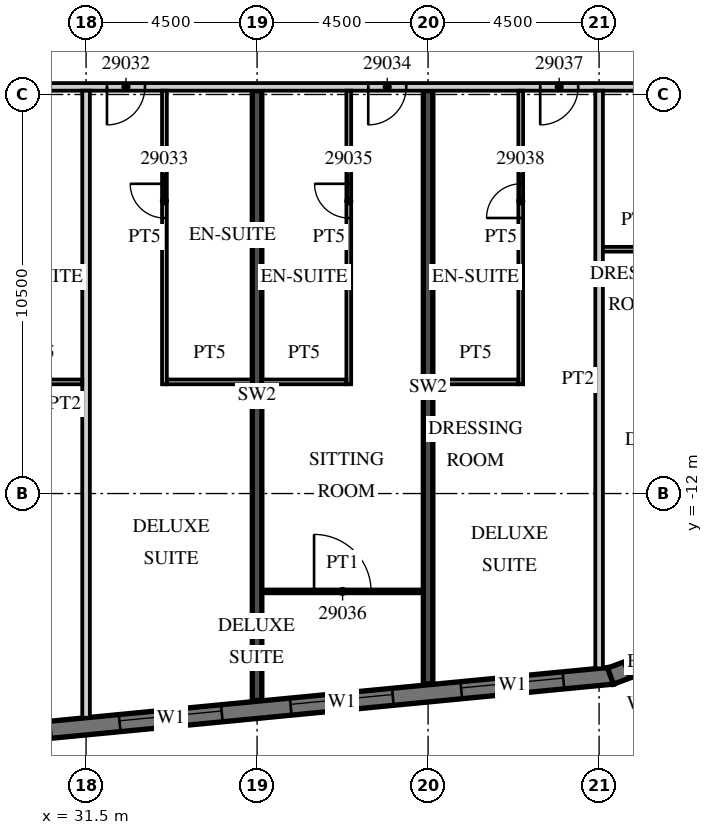
"""IFC4 building model, lengths in metres.
Left out: names, types, materials, properties, quantities, classifications, styles, units other than length and angle.
Written with IfcOpenShell. Run it as: python <this file> out.ifc"""

import sys

from ifc_helpers import new_model, si_unit, direction, frame, frame_2d, origin, place, context, subcontext, project, spatial, polyline, rectangle, outline, extrude, element, fill, save


model = new_model("IFC4")
c1 = context("Model", 3, precision=1e-05, world=origin(), true_north=direction((0.0, 1.0)))
c2 = subcontext(c1, "Body", "Model", "MODEL_VIEW")
j1 = project(units=[si_unit("LENGTHUNIT", "METRE"), si_unit("PLANEANGLEUNIT", "RADIAN")], contexts=[c1])
p1 = place(None, origin())
s1 = spatial("IfcSite", under=j1, at=p1, CompositionType="ELEMENT")
p2 = place(p1, origin())
s2 = spatial("IfcBuilding", under=s1, at=p2, CompositionType="ELEMENT")
p3 = place(p2, frame((0.0, 0.0, 130.6)))
s3 = spatial("IfcBuildingStorey", under=s2, at=p3, CompositionType="ELEMENT", Elevation=130.6)
p4 = place(p3, frame((36.0, -17.444, 0.0), z_axis=(0.0, 0.0, 1.0), x_axis=(0.0, 1.0, 0.0)))
e1 = element("IfcWall", 1, at=p4, inside=s3, PredefinedType="SHEAR", context=c2, shape_type="SweptSolid", body=[
    extrude(rectangle(XDim=16.044, YDim=0.25, at=frame_2d((8.022, 0.0))), origin(), (0.0, 0.0, 1.0), 3.3),
])
p5 = place(p3, frame((40.5, -17.011, 0.0), z_axis=(0.0, 0.0, 1.0), x_axis=(0.0, 1.0, 0.0)))
e2 = element("IfcWall", 2, at=p5, inside=s3, PredefinedType="SHEAR", context=c2, shape_type="SweptSolid", body=[
    extrude(rectangle(XDim=15.611, YDim=0.25, at=frame_2d((7.805, 0.0))), origin(), (0.0, 0.0, 1.0), 3.3),
])
p6 = place(p3, frame((-13.521, -22.46, 0.0), z_axis=(0.0, 0.0, 1.0), x_axis=(0.995396096335, 0.095846812164, 0.0)))
e3 = element("IfcWall", 3, at=p6, inside=s3, PredefinedType="SOLIDWALL", context=c2, shape_type="SweptSolid", body=[
    extrude(rectangle(XDim=59.151, YDim=0.45, at=frame_2d((29.575, 0.0))), origin(), (0.0, 0.0, 1.0), 3.02),
])
p7 = place(p6, frame((0.91, 0.0, 0.45)))
e4 = element("IfcOpeningElement", 4, at=p7, cuts=e3, PredefinedType="OPENING", context=c2, shape_type="SweptSolid", body=[
    extrude(rectangle(XDim=2.7, YDim=2.25, at=frame_2d((1.35, 1.125))), frame((0.0, 0.235, 0.0), z_axis=(0.0, -1.0, 0.0), x_axis=(1.0, 0.0, 0.0)), (0.0, 0.0, 1.0), 0.47),
])
p8 = place(p6, frame((5.431, 0.0, 0.45)))
e5 = element("IfcOpeningElement", 5, at=p8, cuts=e3, PredefinedType="OPENING", context=c2, shape_type="SweptSolid", body=[
    extrude(rectangle(XDim=2.7, YDim=2.25, at=frame_2d((1.35, 1.125))), frame((0.0, 0.235, 0.0), z_axis=(0.0, -1.0, 0.0), x_axis=(1.0, 0.0, 0.0)), (0.0, 0.0, 1.0), 0.47),
])
p9 = place(p6, frame((9.952, 0.0, 0.45)))
e6 = element("IfcOpeningElement", 6, at=p9, cuts=e3, PredefinedType="OPENING", context=c2, shape_type="SweptSolid", body=[
    extrude(rectangle(XDim=2.7, YDim=2.25, at=frame_2d((1.35, 1.125))), frame((0.0, 0.235, 0.0), z_axis=(0.0, -1.0, 0.0), x_axis=(1.0, 0.0, 0.0)), (0.0, 0.0, 1.0), 0.47),
])
p10 = place(p6, frame((14.473, 0.0, 0.45)))
e7 = element("IfcOpeningElement", 7, at=p10, cuts=e3, PredefinedType="OPENING", context=c2, shape_type="SweptSolid", body=[
    extrude(rectangle(XDim=2.7, YDim=2.25, at=frame_2d((1.35, 1.125))), frame((0.0, 0.235, 0.0), z_axis=(0.0, -1.0, 0.0), x_axis=(1.0, 0.0, 0.0)), (0.0, 0.0, 1.0), 0.47),
])
p11 = place(p6, frame((18.994, 0.0, 0.45)))
e8 = element("IfcOpeningElement", 8, at=p11, cuts=e3, PredefinedType="OPENING", context=c2, shape_type="SweptSolid", body=[
    extrude(rectangle(XDim=2.7, YDim=2.25, at=frame_2d((1.35, 1.125))), frame((0.0, 0.235, 0.0), z_axis=(0.0, -1.0, 0.0), x_axis=(1.0, 0.0, 0.0)), (0.0, 0.0, 1.0), 0.47),
])
p12 = place(p6, frame((23.514, 0.0, 0.45)))
e9 = element("IfcOpeningElement", 9, at=p12, cuts=e3, PredefinedType="OPENING", context=c2, shape_type="SweptSolid", body=[
    extrude(rectangle(XDim=2.7, YDim=2.25, at=frame_2d((1.35, 1.125))), frame((0.0, 0.235, 0.0), z_axis=(0.0, -1.0, 0.0), x_axis=(1.0, 0.0, 0.0)), (0.0, 0.0, 1.0), 0.47),
])
p13 = place(p6, frame((28.035, 0.0, 0.45)))
e10 = element("IfcOpeningElement", 10, at=p13, cuts=e3, PredefinedType="OPENING", context=c2, shape_type="SweptSolid", body=[
    extrude(rectangle(XDim=2.7, YDim=2.25, at=frame_2d((1.35, 1.125))), frame((0.0, 0.235, 0.0), z_axis=(0.0, -1.0, 0.0), x_axis=(1.0, 0.0, 0.0)), (0.0, 0.0, 1.0), 0.47),
])
p14 = place(p6, frame((32.556, 0.0, 0.45)))
e11 = element("IfcOpeningElement", 11, at=p14, cuts=e3, PredefinedType="OPENING", context=c2, shape_type="SweptSolid", body=[
    extrude(rectangle(XDim=2.7, YDim=2.25, at=frame_2d((1.35, 1.125))), frame((0.0, 0.235, 0.0), z_axis=(0.0, -1.0, 0.0), x_axis=(1.0, 0.0, 0.0)), (0.0, 0.0, 1.0), 0.47),
])
p15 = place(p6, frame((37.077, 0.0, 0.45)))
e12 = element("IfcOpeningElement", 12, at=p15, cuts=e3, PredefinedType="OPENING", context=c2, shape_type="SweptSolid", body=[
    extrude(rectangle(XDim=2.7, YDim=2.25, at=frame_2d((1.35, 1.125))), frame((0.0, 0.235, 0.0), z_axis=(0.0, -1.0, 0.0), x_axis=(1.0, 0.0, 0.0)), (0.0, 0.0, 1.0), 0.47),
])
p16 = place(p6, frame((41.598, 0.0, 0.45)))
e13 = element("IfcOpeningElement", 13, at=p16, cuts=e3, PredefinedType="OPENING", context=c2, shape_type="SweptSolid", body=[
    extrude(rectangle(XDim=2.7, YDim=2.25, at=frame_2d((1.35, 1.125))), frame((0.0, 0.235, 0.0), z_axis=(0.0, -1.0, 0.0), x_axis=(1.0, 0.0, 0.0)), (0.0, 0.0, 1.0), 0.47),
])
p17 = place(p6, frame((46.118, 0.0, 0.45)))
e14 = element("IfcOpeningElement", 14, at=p17, cuts=e3, PredefinedType="OPENING", context=c2, shape_type="SweptSolid", body=[
    extrude(rectangle(XDim=2.7, YDim=2.25, at=frame_2d((1.35, 1.125))), frame((0.0, 0.235, 0.0), z_axis=(0.0, -1.0, 0.0), x_axis=(1.0, 0.0, 0.0)), (0.0, 0.0, 1.0), 0.47),
])
p18 = place(p6, frame((50.639, 0.0, 0.45)))
e15 = element("IfcOpeningElement", 15, at=p18, cuts=e3, PredefinedType="OPENING", context=c2, shape_type="SweptSolid", body=[
    extrude(rectangle(XDim=2.7, YDim=2.25, at=frame_2d((1.35, 1.125))), frame((0.0, 0.235, 0.0), z_axis=(0.0, -1.0, 0.0), x_axis=(1.0, 0.0, 0.0)), (0.0, 0.0, 1.0), 0.47),
])
p19 = place(p6, frame((55.15, 0.0, 0.45)))
e16 = element("IfcOpeningElement", 16, at=p19, cuts=e3, PredefinedType="OPENING", context=c2, shape_type="SweptSolid", body=[
    extrude(rectangle(XDim=2.7, YDim=2.25, at=frame_2d((1.35, 1.125))), frame((0.0, 0.235, 0.0), z_axis=(0.0, -1.0, 0.0), x_axis=(1.0, 0.0, 0.0)), (0.0, 0.0, 1.0), 0.47),
])
p20 = place(p3, frame((45.3, -16.804, 0.0), z_axis=(0.0, 0.0, 1.0), x_axis=(0.936677599948, 0.350192909346, 0.0)))
e17 = element("IfcWall", 17, at=p20, inside=s3, PredefinedType="SOLIDWALL", context=c2, shape_type="SweptSolid", body=[
    extrude(outline(polyline([(0.0, -0.225), (2.071, -0.225), (1.95, 0.225), (0.121, 0.225), (0.0, -0.225)])), origin(), (0.0, 0.0, 1.0), 3.02),
])
p21 = place(p20, frame((0.435, 0.0, 0.45)))
e18 = element("IfcOpeningElement", 18, at=p21, cuts=e17, PredefinedType="OPENING", context=c2, shape_type="SweptSolid", body=[
    extrude(rectangle(XDim=1.2, YDim=2.25, at=frame_2d((0.6, 1.125))), frame((0.0, 0.235, 0.0), z_axis=(0.0, -1.0, 0.0), x_axis=(1.0, 0.0, 0.0)), (0.0, 0.0, 1.0), 0.47),
])
p22 = place(p3, frame((48.753, -12.672, 0.0), z_axis=(0.0, 0.0, 1.0), x_axis=(-0.095842661909, 0.995396495954, 0.0)))
e19 = element("IfcWall", 19, at=p22, inside=s3, PredefinedType="SOLIDWALL", context=c2, shape_type="SweptSolid", body=[
    extrude(rectangle(XDim=35.0, YDim=0.45, at=frame_2d((17.5, 0.0))), origin(), (0.0, 0.0, 1.0), 3.02),
])
p23 = place(p22, frame((3.072, 0.0, 0.45)))
e20 = element("IfcOpeningElement", 20, at=p23, cuts=e19, PredefinedType="OPENING", context=c2, shape_type="SweptSolid", body=[
    extrude(rectangle(XDim=3.3, YDim=2.25, at=frame_2d((1.65, 1.125))), frame((0.0, 0.235, 0.0), z_axis=(0.0, -1.0, 0.0), x_axis=(1.0, 0.0, 0.0)), (0.0, 0.0, 1.0), 0.47),
])
p24 = place(p22, frame((7.593, 0.0, 0.45)))
e21 = element("IfcOpeningElement", 21, at=p24, cuts=e19, PredefinedType="OPENING", context=c2, shape_type="SweptSolid", body=[
    extrude(rectangle(XDim=3.3, YDim=2.25, at=frame_2d((1.65, 1.125))), frame((0.0, 0.235, 0.0), z_axis=(0.0, -1.0, 0.0), x_axis=(1.0, 0.0, 0.0)), (0.0, 0.0, 1.0), 0.47),
])
p25 = place(p3, frame((-13.5, -1.3, 0.0), z_axis=(0.0, 0.0, 1.0), x_axis=(1.0, 0.0, 0.0)))
e22 = element("IfcWall", 22, at=p25, inside=s3, PredefinedType="PARTITIONING", context=c2, shape_type="SweptSolid", body=[
    extrude(rectangle(XDim=60.932, YDim=0.2, at=frame_2d((30.466, 0.0))), origin(), (0.0, 0.0, 1.0), 3.02),
])
p26 = place(p25, frame((2.925, 0.0, 0.0)))
e23 = element("IfcOpeningElement", 23, at=p26, cuts=e22, PredefinedType="OPENING", context=c2, shape_type="SweptSolid", body=[
    extrude(rectangle(XDim=1.0, YDim=2.1, at=frame_2d((0.5, 1.05))), frame((0.0, 0.11, 0.0), z_axis=(0.0, -1.0, 0.0), x_axis=(1.0, 0.0, 0.0)), (0.0, 0.0, 1.0), 0.22),
])
p27 = place(p25, frame((9.863, 0.0, 0.0)))
e24 = element("IfcOpeningElement", 24, at=p27, cuts=e22, PredefinedType="OPENING", context=c2, shape_type="SweptSolid", body=[
    extrude(rectangle(XDim=1.2, YDim=2.1, at=frame_2d((0.6, 1.05))), frame((0.0, 0.11, 0.0), z_axis=(0.0, -1.0, 0.0), x_axis=(1.0, 0.0, 0.0)), (0.0, 0.0, 1.0), 0.22),
])
p28 = place(p25, frame((14.075, 0.0, 0.0)))
e25 = element("IfcOpeningElement", 25, at=p28, cuts=e22, PredefinedType="OPENING", context=c2, shape_type="SweptSolid", body=[
    extrude(rectangle(XDim=1.0, YDim=2.1, at=frame_2d((0.5, 1.05))), frame((0.0, 0.11, 0.0), z_axis=(0.0, -1.0, 0.0), x_axis=(1.0, 0.0, 0.0)), (0.0, 0.0, 1.0), 0.22),
])
p29 = place(p25, frame((18.55, 0.0, 0.0)))
e26 = element("IfcOpeningElement", 26, at=p29, cuts=e22, PredefinedType="OPENING", context=c2, shape_type="SweptSolid", body=[
    extrude(rectangle(XDim=1.0, YDim=2.1, at=frame_2d((0.5, 1.05))), frame((0.0, 0.11, 0.0), z_axis=(0.0, -1.0, 0.0), x_axis=(1.0, 0.0, 0.0)), (0.0, 0.0, 1.0), 0.22),
])
p30 = place(p25, frame((24.938, 0.0, 0.0)))
e27 = element("IfcOpeningElement", 27, at=p30, cuts=e22, PredefinedType="OPENING", context=c2, shape_type="SweptSolid", body=[
    extrude(rectangle(XDim=1.2, YDim=2.1, at=frame_2d((0.6, 1.05))), frame((0.0, 0.11, 0.0), z_axis=(0.0, -1.0, 0.0), x_axis=(1.0, 0.0, 0.0)), (0.0, 0.0, 1.0), 0.22),
])
p31 = place(p25, frame((36.862, 0.0, 0.0)))
e28 = element("IfcOpeningElement", 28, at=p31, cuts=e22, PredefinedType="OPENING", context=c2, shape_type="SweptSolid", body=[
    extrude(rectangle(XDim=1.2, YDim=2.1, at=frame_2d((0.6, 1.05))), frame((0.0, 0.11, 0.0), z_axis=(0.0, -1.0, 0.0), x_axis=(1.0, 0.0, 0.0)), (0.0, 0.0, 1.0), 0.22),
])
p32 = place(p25, frame((41.075, 0.0, 0.0)))
e29 = element("IfcOpeningElement", 29, at=p32, cuts=e22, PredefinedType="OPENING", context=c2, shape_type="SweptSolid", body=[
    extrude(rectangle(XDim=1.0, YDim=2.1, at=frame_2d((0.5, 1.05))), frame((0.0, 0.11, 0.0), z_axis=(0.0, -1.0, 0.0), x_axis=(1.0, 0.0, 0.0)), (0.0, 0.0, 1.0), 0.22),
])
p33 = place(p25, frame((45.55, 0.0, 0.0)))
e30 = element("IfcOpeningElement", 30, at=p33, cuts=e22, PredefinedType="OPENING", context=c2, shape_type="SweptSolid", body=[
    extrude(rectangle(XDim=1.0, YDim=2.1, at=frame_2d((0.5, 1.05))), frame((0.0, 0.11, 0.0), z_axis=(0.0, -1.0, 0.0), x_axis=(1.0, 0.0, 0.0)), (0.0, 0.0, 1.0), 0.22),
])
p34 = place(p25, frame((52.425, 0.0, 0.0)))
e31 = element("IfcOpeningElement", 31, at=p34, cuts=e22, PredefinedType="OPENING", context=c2, shape_type="SweptSolid", body=[
    extrude(rectangle(XDim=1.0, YDim=2.1, at=frame_2d((0.5, 1.05))), frame((0.0, 0.11, 0.0), z_axis=(0.0, -1.0, 0.0), x_axis=(1.0, 0.0, 0.0)), (0.0, 0.0, 1.0), 0.22),
])
p35 = place(p25, frame((56.95, 0.0, 0.0)))
e32 = element("IfcOpeningElement", 32, at=p35, cuts=e22, PredefinedType="OPENING", context=c2, shape_type="SweptSolid", body=[
    extrude(rectangle(XDim=1.0, YDim=2.1, at=frame_2d((0.5, 1.05))), frame((0.0, 0.11, 0.0), z_axis=(0.0, -1.0, 0.0), x_axis=(1.0, 0.0, 0.0)), (0.0, 0.0, 1.0), 0.22),
])
p36 = place(p25, frame((59.882, 0.0, 0.0)))
e33 = element("IfcOpeningElement", 33, at=p36, cuts=e22, PredefinedType="OPENING", context=c2, shape_type="SweptSolid", body=[
    extrude(rectangle(XDim=0.9, YDim=2.1, at=frame_2d((0.45, 1.05))), frame((0.0, 0.11, 0.0), z_axis=(0.0, -1.0, 0.0), x_axis=(1.0, 0.0, 0.0)), (0.0, 0.0, 1.0), 0.22),
])
p37 = place(p3, frame((31.5, -17.899, 0.0), z_axis=(0.0, 0.0, 1.0), x_axis=(0.0, 1.0, 0.0)))
e34 = element("IfcWall", 34, at=p37, inside=s3, PredefinedType="PARTITIONING", context=c2, shape_type="SweptSolid", body=[
    extrude(rectangle(XDim=16.499, YDim=0.2, at=frame_2d((8.25, 0.0))), origin(), (0.0, 0.0, 1.0), 3.02),
])
p38 = place(p3, frame((29.15, -9.062, 0.0), z_axis=(0.0, 0.0, 1.0), x_axis=(1.0, 0.0, 0.0)))
e35 = element("IfcWall", 35, at=p38, inside=s3, PredefinedType="PARTITIONING", context=c2, shape_type="SweptSolid", body=[
    extrude(rectangle(XDim=2.25, YDim=0.125, at=frame_2d((1.125, 0.0))), origin(), (0.0, 0.0, 1.0), 3.02),
])
p39 = place(p3, frame((33.562, -9.125, 0.0), z_axis=(0.0, 0.0, 1.0), x_axis=(0.0, 1.0, 0.0)))
e36 = element("IfcWall", 36, at=p39, inside=s3, PredefinedType="PARTITIONING", context=c2, shape_type="SweptSolid", body=[
    extrude(rectangle(XDim=7.725, YDim=0.125, at=frame_2d((3.863, 0.0))), origin(), (0.0, 0.0, 1.0), 3.02),
])
p40 = place(p39, frame((4.375, 0.0, 0.0)))
e37 = element("IfcOpeningElement", 37, at=p40, cuts=e36, PredefinedType="OPENING", context=c2, shape_type="SweptSolid", body=[
    extrude(rectangle(XDim=0.9, YDim=2.1, at=frame_2d((0.45, 1.05))), frame((0.0, 0.073, 0.0), z_axis=(0.0, -1.0, 0.0), x_axis=(1.0, 0.0, 0.0)), (0.0, 0.0, 1.0), 0.145),
])
p41 = place(p3, frame((33.625, -9.062, 0.0), z_axis=(0.0, 0.0, 1.0), x_axis=(1.0, 0.0, 0.0)))
e38 = element("IfcWall", 38, at=p41, inside=s3, PredefinedType="PARTITIONING", context=c2, shape_type="SweptSolid", body=[
    extrude(rectangle(XDim=2.25, YDim=0.125, at=frame_2d((1.125, 0.0))), origin(), (0.0, 0.0, 1.0), 3.02),
])
p42 = place(p3, frame((38.413, -9.125, 0.0), z_axis=(0.0, 0.0, 1.0), x_axis=(0.0, 1.0, 0.0)))
e39 = element("IfcWall", 39, at=p42, inside=s3, PredefinedType="PARTITIONING", context=c2, shape_type="SweptSolid", body=[
    extrude(rectangle(XDim=7.725, YDim=0.125, at=frame_2d((3.863, 0.0))), origin(), (0.0, 0.0, 1.0), 3.02),
])
p43 = place(p42, frame((4.375, 0.0, 0.0)))
e40 = element("IfcOpeningElement", 40, at=p43, cuts=e39, PredefinedType="OPENING", context=c2, shape_type="SweptSolid", body=[
    extrude(rectangle(XDim=0.9, YDim=2.1, at=frame_2d((0.45, 1.05))), frame((0.0, 0.073, 0.0), z_axis=(0.0, -1.0, 0.0), x_axis=(1.0, 0.0, 0.0)), (0.0, 0.0, 1.0), 0.145),
])
p44 = place(p3, frame((36.125, -9.062, 0.0), z_axis=(0.0, 0.0, 1.0), x_axis=(1.0, 0.0, 0.0)))
e41 = element("IfcWall", 41, at=p44, inside=s3, PredefinedType="PARTITIONING", context=c2, shape_type="SweptSolid", body=[
    extrude(rectangle(XDim=2.225, YDim=0.125, at=frame_2d((1.113, 0.0))), origin(), (0.0, 0.0, 1.0), 3.02),
])
p45 = place(p3, frame((36.125, -14.575, 0.0), z_axis=(0.0, 0.0, 1.0), x_axis=(1.0, 0.0, 0.0)))
e42 = element("IfcWall", 42, at=p45, inside=s3, PredefinedType="PARTITIONING", context=c2, shape_type="SweptSolid", body=[
    extrude(rectangle(XDim=4.25, YDim=0.1, at=frame_2d((2.125, 0.0))), origin(), (0.0, 0.0, 1.0), 3.02),
])
p46 = place(p45, frame((1.375, 0.0, 0.0)))
e43 = element("IfcOpeningElement", 43, at=p46, cuts=e42, PredefinedType="OPENING", context=c2, shape_type="SweptSolid", body=[
    extrude(rectangle(XDim=1.5, YDim=2.1, at=frame_2d((0.75, 1.05))), frame((0.0, 0.06, 0.0), z_axis=(0.0, -1.0, 0.0), x_axis=(1.0, 0.0, 0.0)), (0.0, 0.0, 1.0), 0.12),
])
p47 = place(p3, frame((45.0, -16.599, 0.0), z_axis=(0.0, 0.0, 1.0), x_axis=(0.0, 1.0, 0.0)))
e44 = element("IfcWall", 44, at=p47, inside=s3, PredefinedType="PARTITIONING", context=c2, shape_type="SweptSolid", body=[
    extrude(rectangle(XDim=15.199, YDim=0.2, at=frame_2d((7.6, 0.0))), origin(), (0.0, 0.0, 1.0), 3.02),
])
p48 = place(p3, frame((42.938, -9.125, 0.0), z_axis=(0.0, 0.0, 1.0), x_axis=(0.0, 1.0, 0.0)))
e45 = element("IfcWall", 45, at=p48, inside=s3, PredefinedType="PARTITIONING", context=c2, shape_type="SweptSolid", body=[
    extrude(rectangle(XDim=7.725, YDim=0.125, at=frame_2d((3.863, 0.0))), origin(), (0.0, 0.0, 1.0), 3.02),
])
p49 = place(p48, frame((4.375, 0.0, 0.0)))
e46 = element("IfcOpeningElement", 46, at=p49, cuts=e45, PredefinedType="OPENING", context=c2, shape_type="SweptSolid", body=[
    extrude(rectangle(XDim=0.9, YDim=2.1, at=frame_2d((0.45, 1.05))), frame((0.0, 0.073, 0.0), z_axis=(0.0, -1.0, 0.0), x_axis=(1.0, 0.0, 0.0)), (0.0, 0.0, 1.0), 0.145),
])
p50 = place(p3, frame((40.625, -9.062, 0.0), z_axis=(0.0, 0.0, 1.0), x_axis=(1.0, 0.0, 0.0)))
e47 = element("IfcWall", 47, at=p50, inside=s3, PredefinedType="PARTITIONING", context=c2, shape_type="SweptSolid", body=[
    extrude(rectangle(XDim=2.25, YDim=0.125, at=frame_2d((1.125, 0.0))), origin(), (0.0, 0.0, 1.0), 3.02),
])
p51 = place(p3, frame((45.1, -5.572, 0.0), z_axis=(0.0, 0.0, 1.0), x_axis=(1.0, 0.0, 0.0)))
e48 = element("IfcWall", 48, at=p51, inside=s3, PredefinedType="PARTITIONING", context=c2, shape_type="SweptSolid", body=[
    extrude(rectangle(XDim=1.8, YDim=0.125, at=frame_2d((0.9, 0.0))), origin(), (0.0, 0.0, 1.0), 3.02),
])
p52 = place(p17, origin())
e49 = element("IfcWindow", 49, at=p52, inside=s3, PartitioningType="SINGLE_PANEL", PredefinedType="WINDOW", context=c2, shape_type="SweptSolid", body=[
    extrude(rectangle(XDim=2.7, YDim=2.25, at=frame_2d((1.35, 1.125))), frame((0.0, 0.09, 0.0), z_axis=(0.0, -1.0, 0.0), x_axis=(1.0, 0.0, 0.0)), (0.0, 0.0, 1.0), 0.06),
])
fill(e14, e49)
p53 = place(p18, origin())
e50 = element("IfcWindow", 50, at=p53, inside=s3, PartitioningType="SINGLE_PANEL", PredefinedType="WINDOW", context=c2, shape_type="SweptSolid", body=[
    extrude(rectangle(XDim=2.7, YDim=2.25, at=frame_2d((1.35, 1.125))), frame((0.0, 0.09, 0.0), z_axis=(0.0, -1.0, 0.0), x_axis=(1.0, 0.0, 0.0)), (0.0, 0.0, 1.0), 0.06),
])
fill(e15, e50)
p54 = place(p19, origin())
e51 = element("IfcWindow", 51, at=p54, inside=s3, PartitioningType="SINGLE_PANEL", PredefinedType="WINDOW", context=c2, shape_type="SweptSolid", body=[
    extrude(rectangle(XDim=2.7, YDim=2.25, at=frame_2d((1.35, 1.125))), frame((0.0, 0.09, 0.0), z_axis=(0.0, -1.0, 0.0), x_axis=(1.0, 0.0, 0.0)), (0.0, 0.0, 1.0), 0.06),
])
fill(e16, e51)
p55 = place(p21, origin())
e52 = element("IfcWindow", 52, at=p55, inside=s3, PartitioningType="SINGLE_PANEL", PredefinedType="WINDOW", context=c2, shape_type="SweptSolid", body=[
    extrude(rectangle(XDim=1.2, YDim=2.25, at=frame_2d((0.6, 1.125))), frame((0.0, 0.09, 0.0), z_axis=(0.0, -1.0, 0.0), x_axis=(1.0, 0.0, 0.0)), (0.0, 0.0, 1.0), 0.06),
])
fill(e18, e52)
p56 = place(p33, origin())
e53 = element("IfcDoor", 53, at=p56, inside=s3, OperationType="SINGLE_SWING_LEFT", PredefinedType="DOOR", context=c2, shape_type="SweptSolid", body=[
    extrude(rectangle(XDim=1.0, YDim=2.1, at=frame_2d((0.5, 1.05))), frame((0.0, 0.025, 0.0), z_axis=(0.0, -1.0, 0.0), x_axis=(1.0, 0.0, 0.0)), (0.0, 0.0, 1.0), 0.05),
])
fill(e30, e53)
p57 = place(p40, origin())
e54 = element("IfcDoor", 54, at=p57, inside=s3, OperationType="SINGLE_SWING_RIGHT", PredefinedType="DOOR", context=c2, shape_type="SweptSolid", body=[
    extrude(rectangle(XDim=0.9, YDim=2.1, at=frame_2d((0.45, 1.05))), frame((0.0, 0.025, 0.0), z_axis=(0.0, -1.0, 0.0), x_axis=(1.0, 0.0, 0.0)), (0.0, 0.0, 1.0), 0.05),
])
fill(e37, e54)
p58 = place(p34, origin())
e55 = element("IfcDoor", 55, at=p58, inside=s3, OperationType="SINGLE_SWING_LEFT", PredefinedType="DOOR", context=c2, shape_type="SweptSolid", body=[
    extrude(rectangle(XDim=1.0, YDim=2.1, at=frame_2d((0.5, 1.05))), frame((0.0, 0.025, 0.0), z_axis=(0.0, -1.0, 0.0), x_axis=(1.0, 0.0, 0.0)), (0.0, 0.0, 1.0), 0.05),
])
fill(e31, e55)
p59 = place(p43, origin())
e56 = element("IfcDoor", 56, at=p59, inside=s3, OperationType="SINGLE_SWING_RIGHT", PredefinedType="DOOR", context=c2, shape_type="SweptSolid", body=[
    extrude(rectangle(XDim=0.9, YDim=2.1, at=frame_2d((0.45, 1.05))), frame((0.0, 0.025, 0.0), z_axis=(0.0, -1.0, 0.0), x_axis=(1.0, 0.0, 0.0)), (0.0, 0.0, 1.0), 0.05),
])
fill(e40, e56)
p60 = place(p46, origin())
e57 = element("IfcDoor", 57, at=p60, inside=s3, OperationType="SINGLE_SWING_LEFT", PredefinedType="DOOR", context=c2, shape_type="SweptSolid", body=[
    extrude(rectangle(XDim=1.5, YDim=2.1, at=frame_2d((0.75, 1.05))), frame((0.0, 0.025, 0.0), z_axis=(0.0, -1.0, 0.0), x_axis=(1.0, 0.0, 0.0)), (0.0, 0.0, 1.0), 0.05),
])
fill(e43, e57)
p61 = place(p35, origin())
e58 = element("IfcDoor", 58, at=p61, inside=s3, OperationType="SINGLE_SWING_LEFT", PredefinedType="DOOR", context=c2, shape_type="SweptSolid", body=[
    extrude(rectangle(XDim=1.0, YDim=2.1, at=frame_2d((0.5, 1.05))), frame((0.0, 0.025, 0.0), z_axis=(0.0, -1.0, 0.0), x_axis=(1.0, 0.0, 0.0)), (0.0, 0.0, 1.0), 0.05),
])
fill(e32, e58)
p62 = place(p49, origin())
e59 = element("IfcDoor", 59, at=p62, inside=s3, OperationType="SINGLE_SWING_LEFT", PredefinedType="DOOR", context=c2, shape_type="SweptSolid", body=[
    extrude(rectangle(XDim=0.9, YDim=2.1, at=frame_2d((0.45, 1.05))), frame((0.0, 0.025, 0.0), z_axis=(0.0, -1.0, 0.0), x_axis=(1.0, 0.0, 0.0)), (0.0, 0.0, 1.0), 0.05),
])
fill(e46, e59)
save(model, sys.argv[1])
